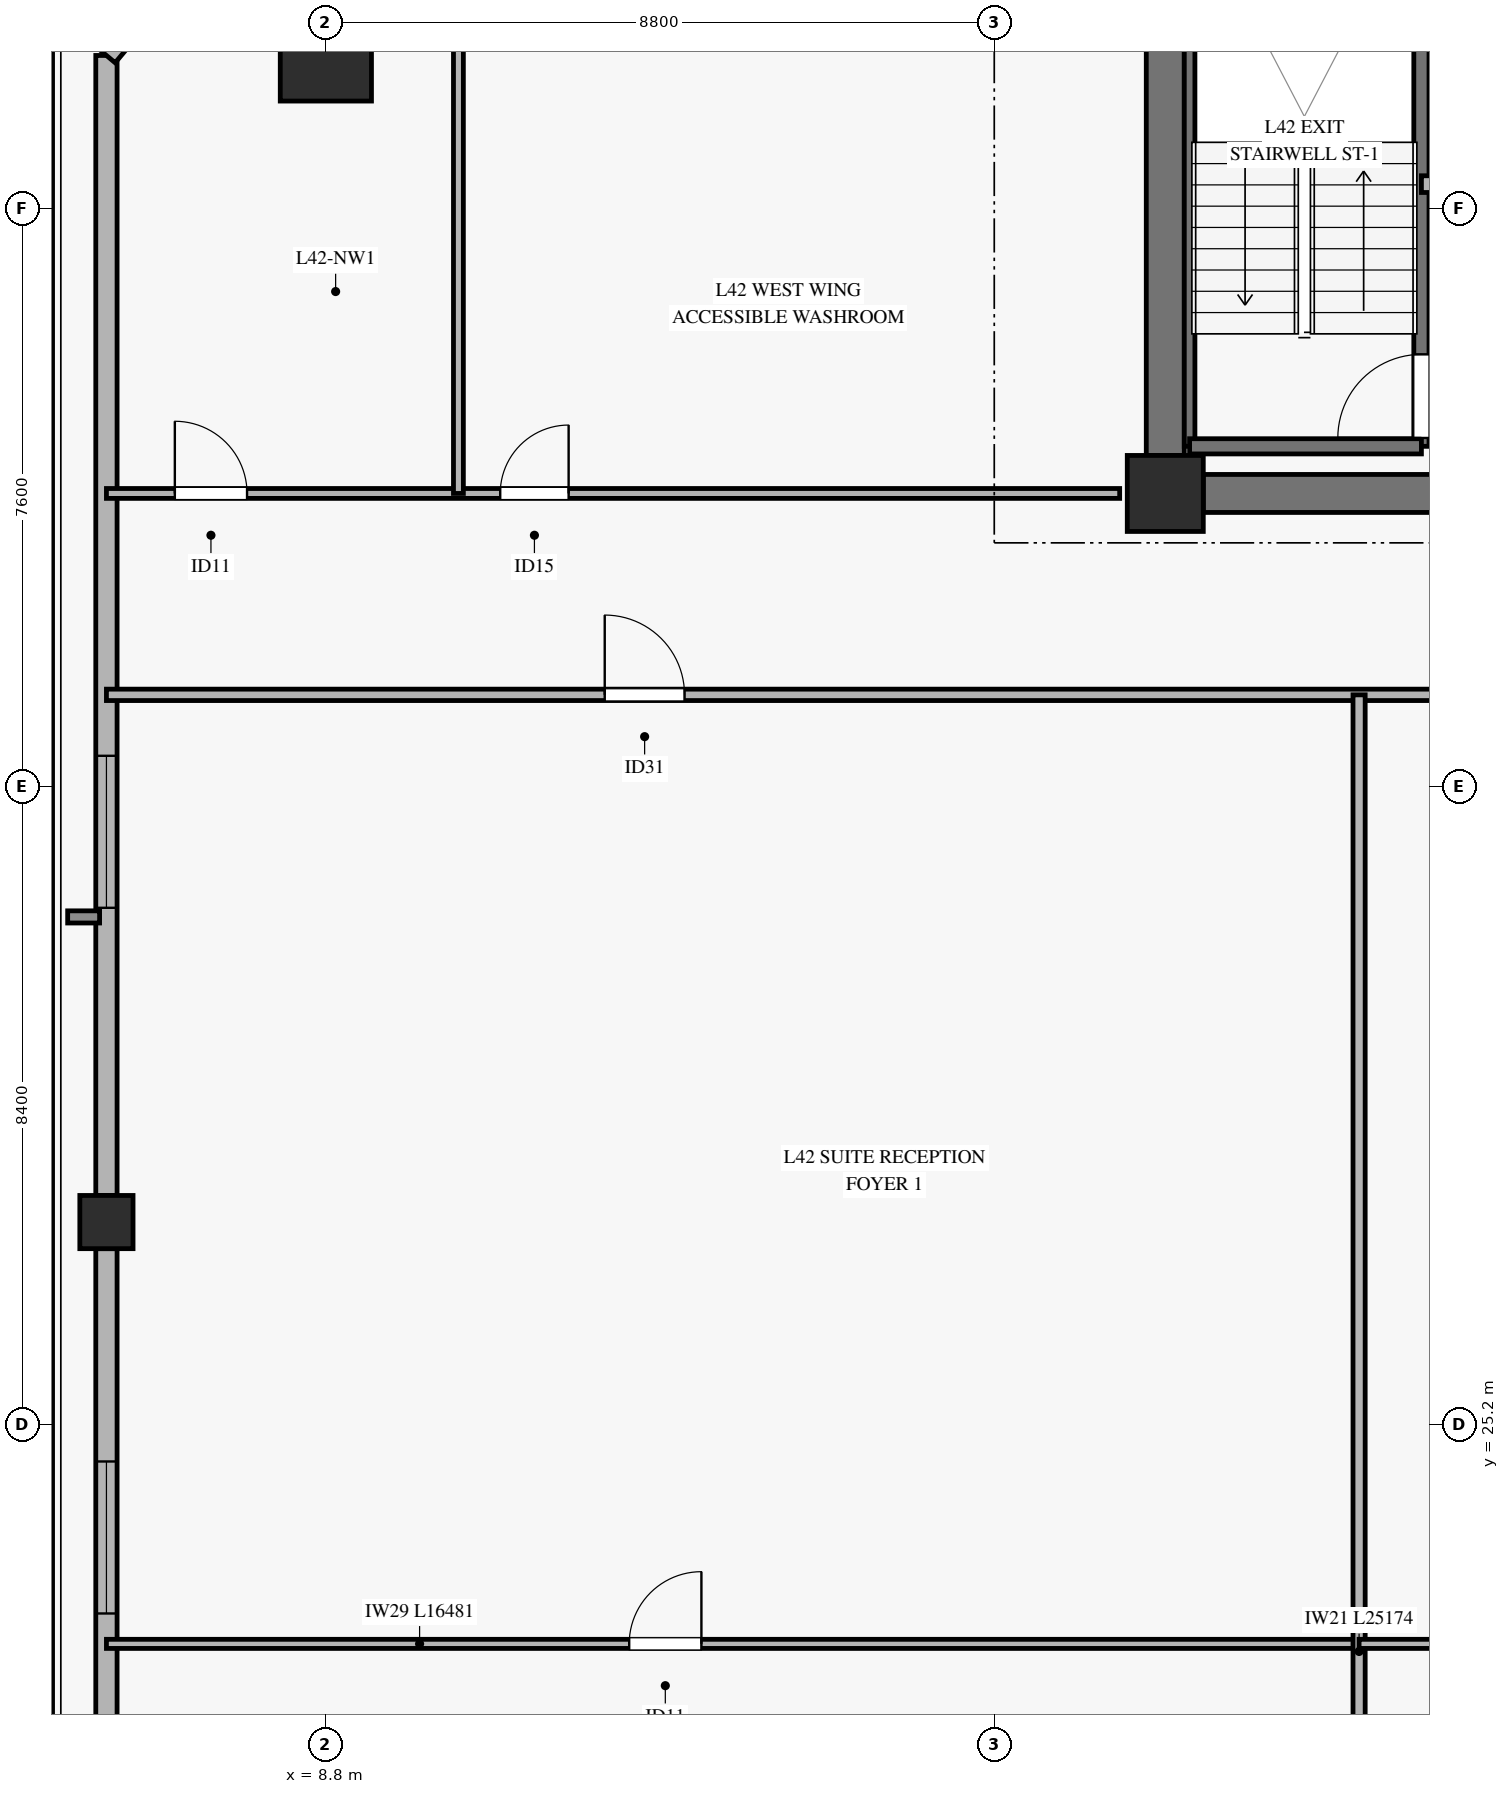
"""IFC4 building model, lengths in metres.
Left out: names, types, materials, properties, quantities, classifications, styles, units other than length and angle.
Written with IfcOpenShell. Run it as: python <this file> out.ifc"""

import sys

from ifc_helpers import new_model, si_unit, direction, frame, frame_2d, origin, origin_2d, place, context, subcontext, project, spatial, rectangle, hollow_rectangle, extrude, source, transform, mapped, element, fill, save


model = new_model("IFC4")
c1 = context("Model", 3, precision=1e-05, world=origin(), true_north=direction((0.0, 1.0)))
c2 = subcontext(c1, "Body", "Model", "MODEL_VIEW")
j1 = project(units=[si_unit("LENGTHUNIT", "METRE"), si_unit("PLANEANGLEUNIT", "RADIAN")], contexts=[c1])
p1 = place(None, origin())
s1 = spatial("IfcSite", under=j1, at=p1, CompositionType="ELEMENT")
p2 = place(p1, origin())
s2 = spatial("IfcBuilding", under=s1, at=p2, CompositionType="ELEMENT")
p3 = place(p2, frame((0.0, 0.0, 170.2)))
s3 = spatial("IfcBuildingStorey", under=s2, at=p3, CompositionType="ELEMENT", Elevation=170.2)
m1 = source(origin(), c2, "Body", "SweptSolid", [
    extrude(rectangle(XDim=1.0, YDim=1.0, at=origin_2d()), origin(), (0.0, 0.0, 1.0), 3.27),
])
p4 = place(p3, frame((19.85, 37.45, 0.0), z_axis=(0.0, 0.0, 1.0), x_axis=(1.0, 0.0, 0.0)))
e1 = element("IfcColumn", 1, at=p4, inside=s3, PredefinedType="PILASTER", context=c2, shape_type="MappedRepresentation", body=[
    mapped(m1, transform((0.0, 0.0, 0.0), x_axis=(1.0, 0.0, 0.0), y_axis=(0.0, 1.0, 0.0), z_axis=(0.0, 0.0, 1.0), scale=1.0)),
])
p5 = place(p3, frame((20.35, 37.45, 0.0), z_axis=(0.0, 0.0, 1.0), x_axis=(1.0, 0.0, 0.0)))
e2 = element("IfcWall", 2, at=p5, inside=s3, PredefinedType="SHEAR", context=c2, shape_type="SweptSolid", body=[
    extrude(rectangle(XDim=9.95, YDim=0.5, at=frame_2d((4.975, 0.0))), origin(), (0.0, 0.0, 1.0), 3.27),
])
p6 = place(p5, frame((4.2, 0.0, 0.0)))
e3 = element("IfcOpeningElement", 3, at=p6, cuts=e2, PredefinedType="OPENING", context=c2, shape_type="SweptSolid", body=[
    extrude(rectangle(XDim=1.2, YDim=2.15, at=frame_2d((0.6, 1.075))), frame((0.0, 0.26, 0.0), z_axis=(0.0, -1.0, 0.0), x_axis=(1.0, 0.0, 0.0)), (0.0, 0.0, 1.0), 0.52),
])
p7 = place(p3, frame((19.85, 37.95, 0.0), z_axis=(0.0, 0.0, 1.0), x_axis=(0.0, 1.0, 0.0)))
e4 = element("IfcWall", 4, at=p7, inside=s3, PredefinedType="SHEAR", context=c2, shape_type="SweptSolid", body=[
    extrude(rectangle(XDim=8.1, YDim=0.5, at=frame_2d((4.05, 0.0))), origin(), (0.0, 0.0, 1.0), 3.27),
])
m2 = source(origin(), c2, "Body", "SweptSolid", [
    extrude(hollow_rectangle(XDim=1.2, YDim=1.2, WallThickness=0.055, at=origin_2d()), origin(), (0.0, 0.0, 1.0), 3.27),
])
p8 = place(p3, frame((8.806, 43.213, 0.0), z_axis=(0.0, 0.0, 1.0), x_axis=(1.0, 0.0, 0.0)))
e5 = element("IfcColumn", 5, at=p8, inside=s3, PredefinedType="COLUMN", context=c2, shape_type="MappedRepresentation", body=[
    mapped(m2, transform((0.0, 0.0, 0.0), x_axis=(1.0, 0.0, 0.0), y_axis=(0.0, 1.0, 0.0), z_axis=(0.0, 0.0, 1.0), scale=1.0)),
])
m3 = source(origin(), c2, "Body", "SweptSolid", [
    extrude(hollow_rectangle(XDim=0.7, YDim=0.7, WallThickness=0.032, at=origin_2d()), origin(), (0.0, 0.0, 1.0), 3.27),
])
p9 = place(p3, frame((5.919, 27.863, 0.0), z_axis=(0.0, 0.0, 1.0), x_axis=(1.0, 0.0, 0.0)))
e6 = element("IfcColumn", 6, at=p9, inside=s3, PredefinedType="COLUMN", context=c2, shape_type="MappedRepresentation", body=[
    mapped(m3, transform((0.0, 0.0, 0.0), x_axis=(1.0, 0.0, 0.0), y_axis=(0.0, 1.0, 0.0), z_axis=(0.0, 0.0, 1.0), scale=1.0)),
])
p10 = place(p3, frame((5.919, 12.513, 0.0), z_axis=(0.0, 0.0, 1.0), x_axis=(0.0, 1.0, 0.0)))
e7 = element("IfcWall", 7, at=p10, inside=s3, PredefinedType="SOLIDWALL", context=c2, shape_type="SweptSolid", body=[
    extrude(rectangle(XDim=15.0, YDim=0.28, at=frame_2d((7.5, 0.0))), origin(), (0.0, 0.0, 1.0), 2.75),
])
p11 = place(p10, frame((3.14, 0.0, 0.45)))
e8 = element("IfcOpeningElement", 8, at=p11, cuts=e7, PredefinedType="OPENING", context=c2, shape_type="SweptSolid", body=[
    extrude(rectangle(XDim=2.0, YDim=2.0, at=frame_2d((1.0, 1.0))), frame((0.0, 0.15, 0.0), z_axis=(0.0, -1.0, 0.0), x_axis=(1.0, 0.0, 0.0)), (0.0, 0.0, 1.0), 0.3),
])
p12 = place(p10, frame((10.2, 0.0, 0.45)))
e9 = element("IfcOpeningElement", 9, at=p12, cuts=e7, PredefinedType="OPENING", context=c2, shape_type="SweptSolid", body=[
    extrude(rectangle(XDim=2.0, YDim=2.0, at=frame_2d((1.0, 1.0))), frame((0.0, 0.15, 0.0), z_axis=(0.0, -1.0, 0.0), x_axis=(1.0, 0.0, 0.0)), (0.0, 0.0, 1.0), 0.3),
])
p13 = place(p3, frame((5.919, 28.213, 0.0), z_axis=(0.0, 0.0, 1.0), x_axis=(0.0, 1.0, 0.0)))
e10 = element("IfcWall", 10, at=p13, inside=s3, PredefinedType="SOLIDWALL", context=c2, shape_type="SweptSolid", body=[
    extrude(rectangle(XDim=15.0, YDim=0.28, at=frame_2d((7.5, 0.0))), origin(), (0.0, 0.0, 1.0), 2.75),
])
p14 = place(p13, frame((3.785, 0.0, 0.45)))
e11 = element("IfcOpeningElement", 11, at=p14, cuts=e10, PredefinedType="OPENING", context=c2, shape_type="SweptSolid", body=[
    extrude(rectangle(XDim=2.0, YDim=2.0, at=frame_2d((1.0, 1.0))), frame((0.0, 0.15, 0.0), z_axis=(0.0, -1.0, 0.0), x_axis=(1.0, 0.0, 0.0)), (0.0, 0.0, 1.0), 0.3),
])
p15 = place(p3, frame((8.456, 46.25, 0.0), z_axis=(0.0, 0.0, 1.0), x_axis=(-0.641106288565, -0.76745210063, 0.0)))
e12 = element("IfcWall", 12, at=p15, inside=s3, PredefinedType="SOLIDWALL", context=c2, shape_type="SweptSolid", body=[
    extrude(rectangle(XDim=3.957, YDim=0.3, at=frame_2d((1.979, 0.0))), origin(), (0.0, 0.0, 1.0), 2.75),
])
p16 = place(p15, frame((1.179, 0.0, 0.45)))
e13 = element("IfcOpeningElement", 13, at=p16, cuts=e12, PredefinedType="OPENING", context=c2, shape_type="SweptSolid", body=[
    extrude(rectangle(XDim=1.6, YDim=2.0, at=frame_2d((0.8, 1.0))), frame((0.0, 0.16, 0.0), z_axis=(0.0, -1.0, 0.0), x_axis=(1.0, 0.0, 0.0)), (0.0, 0.0, 1.0), 0.32),
])
p17 = place(p3, frame((20.17, 38.07, 0.0), z_axis=(0.0, 0.0, 1.0), x_axis=(0.0, 1.0, 0.0)))
e14 = element("IfcWall", 14, at=p17, inside=s3, PredefinedType="SOLIDWALL", context=c2, shape_type="SweptSolid", body=[
    extrude(rectangle(XDim=7.25, YDim=0.14, at=frame_2d((3.625, 0.0))), origin(), (0.0, 0.0, 1.0), 3.5),
])
p18 = place(p3, frame((23.22, 38.07, 0.0), z_axis=(0.0, 0.0, 1.0), x_axis=(0.0, 1.0, 0.0)))
e15 = element("IfcWall", 15, at=p18, inside=s3, PredefinedType="SOLIDWALL", context=c2, shape_type="SweptSolid", body=[
    extrude(rectangle(XDim=7.25, YDim=0.2, at=frame_2d((3.625, 0.0))), origin(), (0.0, 0.0, 1.0), 3.5),
])
p19 = place(p18, frame((0.11, 0.0, 0.0)))
e16 = element("IfcOpeningElement", 16, at=p19, cuts=e15, PredefinedType="OPENING", context=c2, shape_type="SweptSolid", body=[
    extrude(rectangle(XDim=1.1, YDim=2.15, at=frame_2d((0.55, 1.075))), frame((0.0, 0.11, 0.0), z_axis=(0.0, -1.0, 0.0), x_axis=(1.0, 0.0, 0.0)), (0.0, 0.0, 1.0), 0.22),
])
p20 = place(p3, frame((20.17, 38.07, 0.0), z_axis=(0.0, 0.0, 1.0), x_axis=(1.0, 0.0, 0.0)))
e17 = element("IfcWall", 17, at=p20, inside=s3, PredefinedType="SOLIDWALL", context=c2, shape_type="SweptSolid", body=[
    extrude(rectangle(XDim=3.05, YDim=0.2, at=frame_2d((1.525, 0.0))), origin(), (0.0, 0.0, 1.0), 3.5),
])
p21 = place(p3, frame((23.22, 41.52, 0.0), z_axis=(0.0, 0.0, 1.0), x_axis=(1.0, 0.0, 0.0)))
e18 = element("IfcWall", 18, at=p21, inside=s3, PredefinedType="SOLIDWALL", context=c2, shape_type="SweptSolid", body=[
    extrude(rectangle(XDim=3.92, YDim=0.22, at=frame_2d((1.96, 0.0))), origin(), (0.0, 0.0, 1.0), 3.27),
])
p22 = place(p21, frame((0.5, 0.0, 0.0)))
e19 = element("IfcOpeningElement", 19, at=p22, cuts=e18, PredefinedType="OPENING", context=c2, shape_type="SweptSolid", body=[
    extrude(rectangle(XDim=1.1, YDim=2.2, at=frame_2d((0.55, 1.1))), frame((0.0, 0.12, 0.0), z_axis=(0.0, -1.0, 0.0), x_axis=(1.0, 0.0, 0.0)), (0.0, 0.0, 1.0), 0.24),
])
p23 = place(p21, frame((2.4, 0.0, 0.0)))
e20 = element("IfcOpeningElement", 20, at=p23, cuts=e18, PredefinedType="OPENING", context=c2, shape_type="SweptSolid", body=[
    extrude(rectangle(XDim=1.1, YDim=2.2, at=frame_2d((0.55, 1.1))), frame((0.0, 0.12, 0.0), z_axis=(0.0, -1.0, 0.0), x_axis=(1.0, 0.0, 0.0)), (0.0, 0.0, 1.0), 0.24),
])
p24 = place(p3, frame((5.919, 34.8, 0.0), z_axis=(0.0, 0.0, 1.0), x_axis=(1.0, 0.0, 0.0)))
e21 = element("IfcWall", 21, at=p24, inside=s3, PredefinedType="PARTITIONING", context=c2, shape_type="SweptSolid", body=[
    extrude(rectangle(XDim=58.562, YDim=0.15, at=frame_2d((29.281, 0.0))), origin(), (0.0, 0.0, 1.0), 2.455),
])
p25 = place(p24, frame((6.556, 0.0, 0.0)))
e22 = element("IfcOpeningElement", 22, at=p25, cuts=e21, PredefinedType="OPENING", context=c2, shape_type="SweptSolid", body=[
    extrude(rectangle(XDim=1.05, YDim=2.15, at=frame_2d((0.525, 1.075))), frame((0.0, 0.085, 0.0), z_axis=(0.0, -1.0, 0.0), x_axis=(1.0, 0.0, 0.0)), (0.0, 0.0, 1.0), 0.17),
])
p26 = place(p24, frame((19.006, 0.0, 0.0)))
e23 = element("IfcOpeningElement", 23, at=p26, cuts=e21, PredefinedType="OPENING", context=c2, shape_type="SweptSolid", body=[
    extrude(rectangle(XDim=1.05, YDim=2.15, at=frame_2d((0.525, 1.075))), frame((0.0, 0.085, 0.0), z_axis=(0.0, -1.0, 0.0), x_axis=(1.0, 0.0, 0.0)), (0.0, 0.0, 1.0), 0.17),
])
p27 = place(p24, frame((24.978, 0.0, 0.0)))
e24 = element("IfcOpeningElement", 24, at=p27, cuts=e21, PredefinedType="OPENING", context=c2, shape_type="SweptSolid", body=[
    extrude(rectangle(XDim=1.05, YDim=2.15, at=frame_2d((0.525, 1.075))), frame((0.0, 0.085, 0.0), z_axis=(0.0, -1.0, 0.0), x_axis=(1.0, 0.0, 0.0)), (0.0, 0.0, 1.0), 0.17),
])
p28 = place(p24, frame((30.851, 0.0, 0.0)))
e25 = element("IfcOpeningElement", 25, at=p28, cuts=e21, PredefinedType="OPENING", context=c2, shape_type="SweptSolid", body=[
    extrude(rectangle(XDim=1.05, YDim=2.15, at=frame_2d((0.525, 1.075))), frame((0.0, 0.085, 0.0), z_axis=(0.0, -1.0, 0.0), x_axis=(1.0, 0.0, 0.0)), (0.0, 0.0, 1.0), 0.17),
])
p29 = place(p24, frame((36.397, 0.0, 0.0)))
e26 = element("IfcOpeningElement", 26, at=p29, cuts=e21, PredefinedType="OPENING", context=c2, shape_type="SweptSolid", body=[
    extrude(rectangle(XDim=1.05, YDim=2.15, at=frame_2d((0.525, 1.075))), frame((0.0, 0.085, 0.0), z_axis=(0.0, -1.0, 0.0), x_axis=(1.0, 0.0, 0.0)), (0.0, 0.0, 1.0), 0.17),
])
p30 = place(p24, frame((46.701, 0.0, 0.0)))
e27 = element("IfcOpeningElement", 27, at=p30, cuts=e21, PredefinedType="OPENING", context=c2, shape_type="SweptSolid", body=[
    extrude(rectangle(XDim=1.05, YDim=2.15, at=frame_2d((0.525, 1.075))), frame((0.0, 0.085, 0.0), z_axis=(0.0, -1.0, 0.0), x_axis=(1.0, 0.0, 0.0)), (0.0, 0.0, 1.0), 0.17),
])
p31 = place(p3, frame((5.919, 22.313, 0.0), z_axis=(0.0, 0.0, 1.0), x_axis=(1.0, 0.0, 0.0)))
e28 = element("IfcWall", 28, at=p31, inside=s3, PredefinedType="PARTITIONING", context=c2, shape_type="SweptSolid", body=[
    extrude(rectangle(XDim=16.481, YDim=0.12, at=frame_2d((8.24, 0.0))), origin(), (0.0, 0.0, 1.0), 2.455),
])
p32 = place(p31, frame((6.878, 0.0, 0.0)))
e29 = element("IfcOpeningElement", 29, at=p32, cuts=e28, PredefinedType="OPENING", context=c2, shape_type="SweptSolid", body=[
    extrude(rectangle(XDim=0.95, YDim=2.1, at=frame_2d((0.475, 1.05))), frame((0.0, 0.07, 0.0), z_axis=(0.0, -1.0, 0.0), x_axis=(1.0, 0.0, 0.0)), (0.0, 0.0, 1.0), 0.14),
])
p33 = place(p3, frame((22.4, 9.626, 0.0), z_axis=(0.0, 0.0, 1.0), x_axis=(0.0, 1.0, 0.0)))
e30 = element("IfcWall", 30, at=p33, inside=s3, PredefinedType="PARTITIONING", context=c2, shape_type="SweptSolid", body=[
    extrude(rectangle(XDim=25.174, YDim=0.16, at=frame_2d((12.587, 0.0))), origin(), (0.0, 0.0, 1.0), 2.755),
])
p34 = place(p3, frame((22.4, 22.313, 0.0), z_axis=(0.0, 0.0, 1.0), x_axis=(1.0, 0.0, 0.0)))
e31 = element("IfcWall", 31, at=p34, inside=s3, PredefinedType="PARTITIONING", context=c2, shape_type="SweptSolid", body=[
    extrude(rectangle(XDim=6.2, YDim=0.12, at=frame_2d((3.1, 0.0))), origin(), (0.0, 0.0, 1.0), 3.27),
])
p35 = place(p34, frame((2.646, 0.0, 0.0)))
e32 = element("IfcOpeningElement", 32, at=p35, cuts=e31, PredefinedType="OPENING", context=c2, shape_type="SweptSolid", body=[
    extrude(rectangle(XDim=0.95, YDim=2.1, at=frame_2d((0.475, 1.05))), frame((0.0, 0.07, 0.0), z_axis=(0.0, -1.0, 0.0), x_axis=(1.0, 0.0, 0.0)), (0.0, 0.0, 1.0), 0.14),
])
p36 = place(p3, frame((5.919, 37.45, 0.0), z_axis=(0.0, 0.0, 1.0), x_axis=(1.0, 0.0, 0.0)))
e33 = element("IfcWall", 33, at=p36, inside=s3, PredefinedType="PARTITIONING", context=c2, shape_type="SweptSolid", body=[
    extrude(rectangle(XDim=13.331, YDim=0.13, at=frame_2d((6.666, 0.0))), origin(), (0.0, 0.0, 1.0), 2.755),
])
p37 = place(p36, frame((0.9, 0.0, 0.0)))
e34 = element("IfcOpeningElement", 34, at=p37, cuts=e33, PredefinedType="OPENING", context=c2, shape_type="SweptSolid", body=[
    extrude(rectangle(XDim=0.95, YDim=2.1, at=frame_2d((0.475, 1.05))), frame((0.0, 0.075, 0.0), z_axis=(0.0, -1.0, 0.0), x_axis=(1.0, 0.0, 0.0)), (0.0, 0.0, 1.0), 0.15),
])
p38 = place(p36, frame((5.181, 0.0, 0.0)))
e35 = element("IfcOpeningElement", 35, at=p38, cuts=e33, PredefinedType="OPENING", context=c2, shape_type="SweptSolid", body=[
    extrude(rectangle(XDim=0.9, YDim=2.1, at=frame_2d((0.45, 1.05))), frame((0.0, 0.075, 0.0), z_axis=(0.0, -1.0, 0.0), x_axis=(1.0, 0.0, 0.0)), (0.0, 0.0, 1.0), 0.15),
])
p39 = place(p3, frame((10.55, 37.45, 0.0), z_axis=(0.0, 0.0, 1.0), x_axis=(0.0, 1.0, 0.0)))
e36 = element("IfcWall", 36, at=p39, inside=s3, PredefinedType="PARTITIONING", context=c2, shape_type="SweptSolid", body=[
    extrude(rectangle(XDim=8.8, YDim=0.13, at=frame_2d((4.4, 0.0))), origin(), (0.0, 0.0, 1.0), 3.27),
])
m4 = source(origin(), c2, "Body", "SweptSolid", [
    extrude(rectangle(XDim=2.0, YDim=2.0, at=frame_2d((1.0, 1.0))), frame((0.0, 0.03, 0.0), z_axis=(0.0, -1.0, 0.0), x_axis=(1.0, 0.0, 0.0)), (0.0, 0.0, 1.0), 0.06),
])
p40 = place(p12, origin())
e37 = element("IfcWindow", 37, at=p40, inside=s3, PartitioningType="SINGLE_PANEL", PredefinedType="WINDOW", context=c2, shape_type="MappedRepresentation", body=[
    mapped(m4, transform((0.0, 0.0, 0.0), x_axis=(1.0, 0.0, 0.0), y_axis=(0.0, 1.0, 0.0), z_axis=(0.0, 0.0, 1.0), scale=1.0)),
])
fill(e9, e37)
p41 = place(p14, origin())
e38 = element("IfcWindow", 38, at=p41, inside=s3, PartitioningType="SINGLE_PANEL", PredefinedType="WINDOW", context=c2, shape_type="MappedRepresentation", body=[
    mapped(m4, transform((0.0, 0.0, 0.0), x_axis=(1.0, 0.0, 0.0), y_axis=(0.0, 1.0, 0.0), z_axis=(0.0, 0.0, 1.0), scale=1.0)),
])
fill(e11, e38)
m5 = source(origin(), c2, "Body", "SweptSolid", [
    extrude(rectangle(XDim=1.1, YDim=2.15, at=frame_2d((0.55, 1.075))), frame((0.0, 0.025, 0.0), z_axis=(0.0, -1.0, 0.0), x_axis=(1.0, 0.0, 0.0)), (0.0, 0.0, 1.0), 0.05),
])
p42 = place(p19, origin())
e39 = element("IfcDoor", 39, at=p42, inside=s3, OperationType="SINGLE_SWING_LEFT", PredefinedType="DOOR", context=c2, shape_type="MappedRepresentation", body=[
    mapped(m5, transform((0.0, 0.0, 0.0), x_axis=(1.0, 0.0, 0.0), y_axis=(0.0, 1.0, 0.0), z_axis=(0.0, 0.0, 1.0), scale=1.0)),
])
fill(e16, e39)
m6 = source(origin(), c2, "Body", "SweptSolid", [
    extrude(rectangle(XDim=1.05, YDim=2.15, at=frame_2d((0.525, 1.075))), frame((0.0, 0.025, 0.0), z_axis=(0.0, -1.0, 0.0), x_axis=(1.0, 0.0, 0.0)), (0.0, 0.0, 1.0), 0.05),
])
p43 = place(p25, origin())
e40 = element("IfcDoor", 40, at=p43, inside=s3, OperationType="SINGLE_SWING_LEFT", PredefinedType="DOOR", context=c2, shape_type="MappedRepresentation", body=[
    mapped(m6, transform((0.0, 0.0, 0.0), x_axis=(1.0, 0.0, 0.0), y_axis=(0.0, 1.0, 0.0), z_axis=(0.0, 0.0, 1.0), scale=1.0)),
])
fill(e22, e40)
m7 = source(origin(), c2, "Body", "SweptSolid", [
    extrude(rectangle(XDim=0.95, YDim=2.1, at=frame_2d((0.475, 1.05))), frame((0.0, 0.025, 0.0), z_axis=(0.0, -1.0, 0.0), x_axis=(1.0, 0.0, 0.0)), (0.0, 0.0, 1.0), 0.05),
])
p44 = place(p32, origin())
e41 = element("IfcDoor", 41, at=p44, inside=s3, OperationType="SINGLE_SWING_RIGHT", PredefinedType="DOOR", context=c2, shape_type="MappedRepresentation", body=[
    mapped(m7, transform((0.0, 0.0, 0.0), x_axis=(1.0, 0.0, 0.0), y_axis=(0.0, 1.0, 0.0), z_axis=(0.0, 0.0, 1.0), scale=1.0)),
])
fill(e29, e41)
p45 = place(p37, origin())
e42 = element("IfcDoor", 42, at=p45, inside=s3, OperationType="SINGLE_SWING_LEFT", PredefinedType="DOOR", context=c2, shape_type="MappedRepresentation", body=[
    mapped(m7, transform((0.0, 0.0, 0.0), x_axis=(1.0, 0.0, 0.0), y_axis=(0.0, 1.0, 0.0), z_axis=(0.0, 0.0, 1.0), scale=1.0)),
])
fill(e34, e42)
m8 = source(origin(), c2, "Body", "SweptSolid", [
    extrude(rectangle(XDim=0.9, YDim=2.1, at=frame_2d((0.45, 1.05))), frame((0.0, 0.025, 0.0), z_axis=(0.0, -1.0, 0.0), x_axis=(1.0, 0.0, 0.0)), (0.0, 0.0, 1.0), 0.05),
])
p46 = place(p38, origin())
e43 = element("IfcDoor", 43, at=p46, inside=s3, OperationType="SINGLE_SWING_RIGHT", PredefinedType="DOOR", context=c2, shape_type="MappedRepresentation", body=[
    mapped(m8, transform((0.0, 0.0, 0.0), x_axis=(1.0, 0.0, 0.0), y_axis=(0.0, 1.0, 0.0), z_axis=(0.0, 0.0, 1.0), scale=1.0)),
])
fill(e35, e43)
save(model, sys.argv[1])
